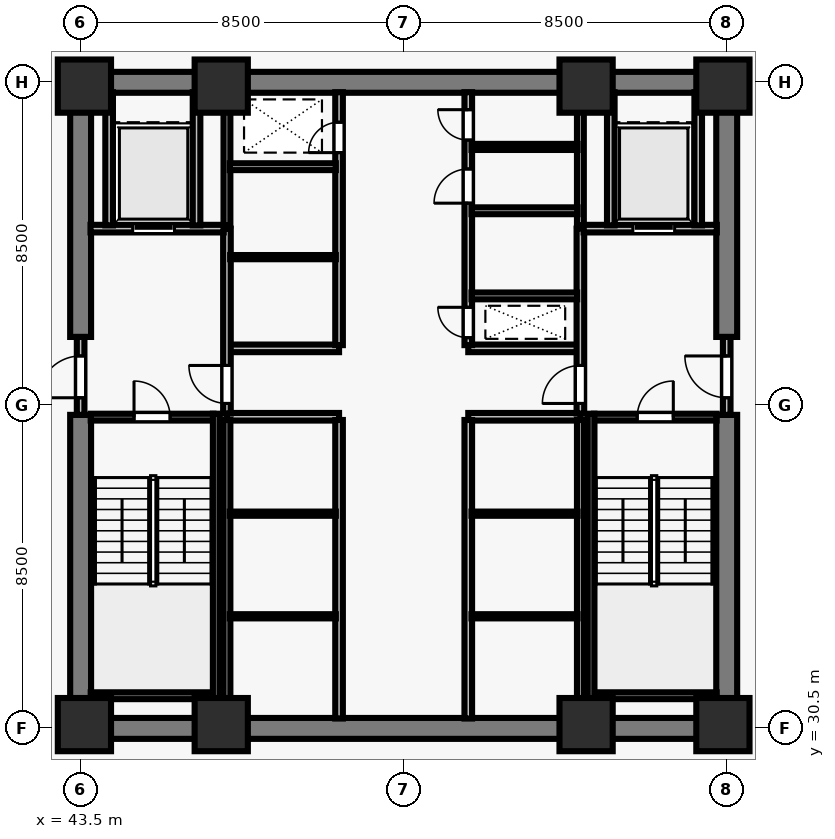
"""IFC4 building model, lengths in metres.
Left out: names, types, materials, properties, quantities, classifications, styles, units other than length and angle.
Written with IfcOpenShell. Run it as: python <this file> out.ifc"""

import sys

from ifc_helpers import new_model, si_unit, direction, frame, frame_2d, origin, origin_2d, place, context, subcontext, project, spatial, rectangle, extrude, element, fill, save


model = new_model("IFC4")
c1 = context("Model", 3, precision=1e-05, world=origin(), true_north=direction((0.0, 1.0)))
c2 = subcontext(c1, "Body", "Model", "MODEL_VIEW")
j1 = project(units=[si_unit("LENGTHUNIT", "METRE"), si_unit("PLANEANGLEUNIT", "RADIAN")], contexts=[c1])
p1 = place(None, origin())
s1 = spatial("IfcSite", under=j1, at=p1, CompositionType="ELEMENT")
p2 = place(p1, origin())
s2 = spatial("IfcBuilding", under=s1, at=p2, CompositionType="ELEMENT")
p3 = place(p2, frame((0.0, 0.0, -4.0)))
s3 = spatial("IfcBuildingStorey", under=s2, at=p3, CompositionType="ELEMENT", Elevation=-4.0)
for number, where, z_axis, x_axis in (
    (1, (43.6, 30.6, 0.0), (0.0, 0.0, 1.0), (1.0, 0.0, 0.0)),
    (2, (47.2, 30.6, 0.0), (0.0, 0.0, 1.0), (1.0, 0.0, 0.0)),
    (3, (56.8, 30.6, 0.0), (0.0, 0.0, 1.0), (1.0, 0.0, 0.0)),
    (4, (60.4, 30.6, 0.0), (0.0, 0.0, 1.0), (1.0, 0.0, 0.0)),
    (5, (43.6, 47.4, 0.0), (0.0, 0.0, 1.0), (1.0, 0.0, 0.0)),
    (6, (47.2, 47.4, 0.0), (0.0, 0.0, 1.0), (1.0, 0.0, 0.0)),
    (7, (56.8, 47.4, 0.0), (0.0, 0.0, 1.0), (1.0, 0.0, 0.0)),
    (8, (60.4, 47.4, 0.0), (0.0, 0.0, 1.0), (1.0, 0.0, 0.0)),
):
    element("IfcColumn", number, at=place(p3, frame(where, z_axis=z_axis, x_axis=x_axis)), inside=s3, PredefinedType="COLUMN", context=c2, shape_type="SweptSolid", body=[
        extrude(rectangle(XDim=1.4, YDim=1.4, at=origin_2d()), origin(), (0.0, 0.0, 1.0), 4.0),
    ])
for number, where, z_axis, x_axis in (
    (9, (43.225, 30.5, 0.0), (0.0, 0.0, 1.0), (1.0, 0.0, 0.0)),
    (10, (43.225, 47.5, 0.0), (0.0, 0.0, 1.0), (1.0, 0.0, 0.0)),
):
    element("IfcWall", number, at=place(p3, frame(where, z_axis=z_axis, x_axis=x_axis)), inside=s3, PredefinedType="SHEAR", context=c2, shape_type="SweptSolid", body=[
        extrude(rectangle(XDim=17.55, YDim=0.55, at=frame_2d((8.775, 0.0))), origin(), (0.0, 0.0, 1.0), 3.7),
    ])
p4 = place(p3, frame((43.5, 30.765, 0.0), z_axis=(0.0, 0.0, 1.0), x_axis=(0.0, 1.0, 0.0)))
e11 = element("IfcWall", 11, at=p4, inside=s3, PredefinedType="SHEAR", context=c2, shape_type="SweptSolid", body=[
    extrude(rectangle(XDim=7.985, YDim=0.55, at=frame_2d((3.993, 0.0))), origin(), (0.0, 0.0, 1.0), 3.7),
])
p5 = place(p3, frame((43.5, 40.8, 0.0), z_axis=(0.0, 0.0, 1.0), x_axis=(0.0, 1.0, 0.0)))
e12 = element("IfcWall", 12, at=p5, inside=s3, PredefinedType="SHEAR", context=c2, shape_type="SweptSolid", body=[
    extrude(rectangle(XDim=6.435, YDim=0.55, at=frame_2d((3.218, 0.0))), origin(), (0.0, 0.0, 1.0), 3.7),
])
p6 = place(p3, frame((60.5, 30.765, 0.0), z_axis=(0.0, 0.0, 1.0), x_axis=(0.0, 1.0, 0.0)))
e13 = element("IfcWall", 13, at=p6, inside=s3, PredefinedType="SHEAR", context=c2, shape_type="SweptSolid", body=[
    extrude(rectangle(XDim=7.985, YDim=0.55, at=frame_2d((3.993, 0.0))), origin(), (0.0, 0.0, 1.0), 3.7),
])
p7 = place(p3, frame((60.5, 40.8, 0.0), z_axis=(0.0, 0.0, 1.0), x_axis=(0.0, 1.0, 0.0)))
e14 = element("IfcWall", 14, at=p7, inside=s3, PredefinedType="SHEAR", context=c2, shape_type="SweptSolid", body=[
    extrude(rectangle(XDim=6.435, YDim=0.55, at=frame_2d((3.218, 0.0))), origin(), (0.0, 0.0, 1.0), 3.7),
])
for number, where, z_axis, x_axis in (
    (15, (47.35, 38.7, 0.0), (0.0, 0.0, 1.0), (1.0, 0.0, 0.0)),
    (16, (47.35, 40.5, 0.0), (0.0, 0.0, 1.0), (1.0, 0.0, 0.0)),
    (17, (53.7, 38.7, 0.0), (0.0, 0.0, 1.0), (1.0, 0.0, 0.0)),
    (18, (53.7, 40.5, 0.0), (0.0, 0.0, 1.0), (1.0, 0.0, 0.0)),
):
    element("IfcWall", number, at=place(p3, frame(where, z_axis=z_axis, x_axis=x_axis)), inside=s3, PredefinedType="SOLIDWALL", context=c2, shape_type="SweptSolid", body=[
        extrude(rectangle(XDim=2.95, YDim=0.2, at=frame_2d((1.475, 0.0))), origin(), (0.0, 0.0, 1.0), 3.7),
    ])
for number, where, z_axis, x_axis in (
    (19, (50.3, 30.76, 0.0), (0.0, 0.0, 1.0), (0.0, 1.0, 0.0)),
    (20, (53.7, 30.76, 0.0), (0.0, 0.0, 1.0), (0.0, 1.0, 0.0)),
):
    element("IfcWall", number, at=place(p3, frame(where, z_axis=z_axis, x_axis=x_axis)), inside=s3, PredefinedType="SOLIDWALL", context=c2, shape_type="SweptSolid", body=[
        extrude(rectangle(XDim=7.855, YDim=0.2, at=frame_2d((3.927, 0.0))), origin(), (0.0, 0.0, 1.0), 3.7),
    ])
p8 = place(p3, frame((50.3, 40.585, 0.0), z_axis=(0.0, 0.0, 1.0), x_axis=(0.0, 1.0, 0.0)))
e21 = element("IfcWall", 21, at=p8, inside=s3, PredefinedType="SOLIDWALL", context=c2, shape_type="SweptSolid", body=[
    extrude(rectangle(XDim=6.655, YDim=0.2, at=frame_2d((3.328, 0.0))), origin(), (0.0, 0.0, 1.0), 3.7),
])
p9 = place(p8, frame((5.065, 0.0, 0.0)))
e22 = element("IfcOpeningElement", 22, at=p9, cuts=e21, PredefinedType="OPENING", context=c2, shape_type="SweptSolid", body=[
    extrude(rectangle(XDim=0.8, YDim=2.08, at=frame_2d((0.4, 1.04))), frame((0.0, 0.11, 0.0), z_axis=(0.0, -1.0, 0.0), x_axis=(1.0, 0.0, 0.0)), (0.0, 0.0, 1.0), 0.22),
])
p10 = place(p3, frame((53.7, 40.585, 0.0), z_axis=(0.0, 0.0, 1.0), x_axis=(0.0, 1.0, 0.0)))
e23 = element("IfcWall", 23, at=p10, inside=s3, PredefinedType="SOLIDWALL", context=c2, shape_type="SweptSolid", body=[
    extrude(rectangle(XDim=6.655, YDim=0.2, at=frame_2d((3.328, 0.0))), origin(), (0.0, 0.0, 1.0), 3.7),
])
p11 = place(p10, frame((0.195, 0.0, 0.0)))
e24 = element("IfcOpeningElement", 24, at=p11, cuts=e23, PredefinedType="OPENING", context=c2, shape_type="SweptSolid", body=[
    extrude(rectangle(XDim=0.8, YDim=2.08, at=frame_2d((0.4, 1.04))), frame((0.0, 0.11, 0.0), z_axis=(0.0, -1.0, 0.0), x_axis=(1.0, 0.0, 0.0)), (0.0, 0.0, 1.0), 0.22),
])
p12 = place(p10, frame((3.735, 0.0, 0.0)))
e25 = element("IfcOpeningElement", 25, at=p12, cuts=e23, PredefinedType="OPENING", context=c2, shape_type="SweptSolid", body=[
    extrude(rectangle(XDim=0.9, YDim=2.12, at=frame_2d((0.45, 1.06))), frame((0.0, 0.11, 0.0), z_axis=(0.0, -1.0, 0.0), x_axis=(1.0, 0.0, 0.0)), (0.0, 0.0, 1.0), 0.22),
])
p13 = place(p10, frame((5.395, 0.0, 0.0)))
e26 = element("IfcOpeningElement", 26, at=p13, cuts=e23, PredefinedType="OPENING", context=c2, shape_type="SweptSolid", body=[
    extrude(rectangle(XDim=0.8, YDim=2.1, at=frame_2d((0.4, 1.05))), frame((0.0, 0.11, 0.0), z_axis=(0.0, -1.0, 0.0), x_axis=(1.0, 0.0, 0.0)), (0.0, 0.0, 1.0), 0.22),
])
p14 = place(p3, frame((43.5, 38.75, 0.0), z_axis=(0.0, 0.0, 1.0), x_axis=(0.0, 1.0, 0.0)))
e27 = element("IfcWall", 27, at=p14, inside=s3, PredefinedType="SOLIDWALL", context=c2, shape_type="SweptSolid", body=[
    extrude(rectangle(XDim=2.05, YDim=0.2, at=frame_2d((1.025, 0.0))), origin(), (0.0, 0.0, 1.0), 3.7),
])
p15 = place(p14, frame((0.45, 0.0, 0.0)))
e28 = element("IfcOpeningElement", 28, at=p15, cuts=e27, PredefinedType="OPENING", context=c2, shape_type="SweptSolid", body=[
    extrude(rectangle(XDim=1.1, YDim=2.15, at=frame_2d((0.55, 1.075))), frame((0.0, 0.11, 0.0), z_axis=(0.0, -1.0, 0.0), x_axis=(1.0, 0.0, 0.0)), (0.0, 0.0, 1.0), 0.22),
])
p16 = place(p3, frame((47.35, 38.785, 0.0), z_axis=(0.0, 0.0, 1.0), x_axis=(0.0, 1.0, 0.0)))
e29 = element("IfcWall", 29, at=p16, inside=s3, PredefinedType="SOLIDWALL", context=c2, shape_type="SweptSolid", body=[
    extrude(rectangle(XDim=4.865, YDim=0.2, at=frame_2d((2.433, 0.0))), origin(), (0.0, 0.0, 1.0), 3.7),
])
p17 = place(p16, frame((0.265, 0.0, 0.0)))
e30 = element("IfcOpeningElement", 30, at=p17, cuts=e29, PredefinedType="OPENING", context=c2, shape_type="SweptSolid", body=[
    extrude(rectangle(XDim=1.0, YDim=2.15, at=frame_2d((0.5, 1.075))), frame((0.0, 0.11, 0.0), z_axis=(0.0, -1.0, 0.0), x_axis=(1.0, 0.0, 0.0)), (0.0, 0.0, 1.0), 0.22),
])
p18 = place(p3, frame((43.76, 43.65, 0.0), z_axis=(0.0, 0.0, 1.0), x_axis=(1.0, 0.0, 0.0)))
e31 = element("IfcWall", 31, at=p18, inside=s3, PredefinedType="SOLIDWALL", context=c2, shape_type="SweptSolid", body=[
    extrude(rectangle(XDim=3.505, YDim=0.2, at=frame_2d((1.752, 0.0))), origin(), (0.0, 0.0, 1.0), 3.7),
])
p19 = place(p18, frame((1.11, 0.0, 0.0)))
e32 = element("IfcOpeningElement", 32, at=p19, cuts=e31, PredefinedType="OPENING", context=c2, shape_type="SweptSolid", body=[
    extrude(rectangle(XDim=1.1, YDim=2.2, at=frame_2d((0.55, 1.1))), frame((0.0, 0.11, 0.0), z_axis=(0.0, -1.0, 0.0), x_axis=(1.0, 0.0, 0.0)), (0.0, 0.0, 1.0), 0.22),
])
for number, where, z_axis, x_axis in (
    (33, (46.55, 43.735, 0.0), (0.0, 0.0, 1.0), (0.0, 1.0, 0.0)),
    (34, (44.25, 43.735, 0.0), (0.0, 0.0, 1.0), (0.0, 1.0, 0.0)),
):
    element("IfcWall", number, at=place(p3, frame(where, z_axis=z_axis, x_axis=x_axis)), inside=s3, PredefinedType="SOLIDWALL", context=c2, shape_type="SweptSolid", body=[
        extrude(rectangle(XDim=3.505, YDim=0.2, at=frame_2d((1.752, 0.0))), origin(), (0.0, 0.0, 1.0), 3.7),
    ])
p20 = place(p3, frame((60.5, 38.75, 0.0), z_axis=(0.0, 0.0, 1.0), x_axis=(0.0, 1.0, 0.0)))
e35 = element("IfcWall", 35, at=p20, inside=s3, PredefinedType="SOLIDWALL", context=c2, shape_type="SweptSolid", body=[
    extrude(rectangle(XDim=2.05, YDim=0.2, at=frame_2d((1.025, 0.0))), origin(), (0.0, 0.0, 1.0), 3.7),
])
p21 = place(p20, frame((0.45, 0.0, 0.0)))
e36 = element("IfcOpeningElement", 36, at=p21, cuts=e35, PredefinedType="OPENING", context=c2, shape_type="SweptSolid", body=[
    extrude(rectangle(XDim=1.1, YDim=2.15, at=frame_2d((0.55, 1.075))), frame((0.0, 0.11, 0.0), z_axis=(0.0, -1.0, 0.0), x_axis=(1.0, 0.0, 0.0)), (0.0, 0.0, 1.0), 0.22),
])
p22 = place(p3, frame((56.65, 38.785, 0.0), z_axis=(0.0, 0.0, 1.0), x_axis=(0.0, 1.0, 0.0)))
e37 = element("IfcWall", 37, at=p22, inside=s3, PredefinedType="SOLIDWALL", context=c2, shape_type="SweptSolid", body=[
    extrude(rectangle(XDim=4.865, YDim=0.2, at=frame_2d((2.433, 0.0))), origin(), (0.0, 0.0, 1.0), 3.7),
])
p23 = place(p22, frame((0.265, 0.0, 0.0)))
e38 = element("IfcOpeningElement", 38, at=p23, cuts=e37, PredefinedType="OPENING", context=c2, shape_type="SweptSolid", body=[
    extrude(rectangle(XDim=1.0, YDim=2.15, at=frame_2d((0.5, 1.075))), frame((0.0, 0.11, 0.0), z_axis=(0.0, -1.0, 0.0), x_axis=(1.0, 0.0, 0.0)), (0.0, 0.0, 1.0), 0.22),
])
p24 = place(p3, frame((56.735, 43.65, 0.0), z_axis=(0.0, 0.0, 1.0), x_axis=(1.0, 0.0, 0.0)))
e39 = element("IfcWall", 39, at=p24, inside=s3, PredefinedType="SOLIDWALL", context=c2, shape_type="SweptSolid", body=[
    extrude(rectangle(XDim=3.505, YDim=0.2, at=frame_2d((1.752, 0.0))), origin(), (0.0, 0.0, 1.0), 3.7),
])
p25 = place(p24, frame((1.295, 0.0, 0.0)))
e40 = element("IfcOpeningElement", 40, at=p25, cuts=e39, PredefinedType="OPENING", context=c2, shape_type="SweptSolid", body=[
    extrude(rectangle(XDim=1.1, YDim=2.2, at=frame_2d((0.55, 1.1))), frame((0.0, 0.11, 0.0), z_axis=(0.0, -1.0, 0.0), x_axis=(1.0, 0.0, 0.0)), (0.0, 0.0, 1.0), 0.22),
])
for number, where, z_axis, x_axis in (
    (41, (57.45, 43.735, 0.0), (0.0, 0.0, 1.0), (0.0, 1.0, 0.0)),
    (42, (59.75, 43.735, 0.0), (0.0, 0.0, 1.0), (0.0, 1.0, 0.0)),
):
    element("IfcWall", number, at=place(p3, frame(where, z_axis=z_axis, x_axis=x_axis)), inside=s3, PredefinedType="SOLIDWALL", context=c2, shape_type="SweptSolid", body=[
        extrude(rectangle(XDim=3.505, YDim=0.2, at=frame_2d((1.752, 0.0))), origin(), (0.0, 0.0, 1.0), 3.7),
    ])
p26 = place(p3, frame((47.35, 30.76, 0.0), z_axis=(0.0, 0.0, 1.0), x_axis=(0.0, 1.0, 0.0)))
e43 = element("IfcWall", 43, at=p26, inside=s3, PredefinedType="SOLIDWALL", context=c2, shape_type="SweptSolid", body=[
    extrude(rectangle(XDim=7.855, YDim=0.18, at=frame_2d((3.927, 0.0))), origin(), (0.0, 0.0, 1.0), 3.7),
])
for number, where, z_axis, x_axis in (
    (44, (47.425, 33.45, 0.0), (0.0, 0.0, 1.0), (1.0, 0.0, 0.0)),
    (45, (47.425, 36.15, 0.0), (0.0, 0.0, 1.0), (1.0, 0.0, 0.0)),
):
    element("IfcWall", number, at=place(p3, frame(where, z_axis=z_axis, x_axis=x_axis)), inside=s3, PredefinedType="PARTITIONING", context=c2, shape_type="SweptSolid", body=[
        extrude(rectangle(XDim=2.79, YDim=0.11, at=frame_2d((1.395, 0.0))), origin(), (0.0, 0.0, 1.0), 3.7),
    ])
p27 = place(p3, frame((56.65, 30.76, 0.0), z_axis=(0.0, 0.0, 1.0), x_axis=(0.0, 1.0, 0.0)))
e46 = element("IfcWall", 46, at=p27, inside=s3, PredefinedType="SOLIDWALL", context=c2, shape_type="SweptSolid", body=[
    extrude(rectangle(XDim=7.855, YDim=0.18, at=frame_2d((3.927, 0.0))), origin(), (0.0, 0.0, 1.0), 3.7),
])
for number, where, z_axis, x_axis in (
    (47, (53.785, 33.45, 0.0), (0.0, 0.0, 1.0), (1.0, 0.0, 0.0)),
    (48, (53.785, 36.15, 0.0), (0.0, 0.0, 1.0), (1.0, 0.0, 0.0)),
):
    element("IfcWall", number, at=place(p3, frame(where, z_axis=z_axis, x_axis=x_axis)), inside=s3, PredefinedType="PARTITIONING", context=c2, shape_type="SweptSolid", body=[
        extrude(rectangle(XDim=2.79, YDim=0.11, at=frame_2d((1.395, 0.0))), origin(), (0.0, 0.0, 1.0), 3.7),
    ])
p28 = place(p3, frame((47.35, 43.735, 0.0), z_axis=(0.0, 0.0, 1.0), x_axis=(0.0, 1.0, 0.0)))
e49 = element("IfcWall", 49, at=p28, inside=s3, PredefinedType="SOLIDWALL", context=c2, shape_type="SweptSolid", body=[
    extrude(rectangle(XDim=3.505, YDim=0.18, at=frame_2d((1.752, 0.0))), origin(), (0.0, 0.0, 1.0), 3.7),
])
p29 = place(p3, frame((47.435, 42.9, 0.0), z_axis=(0.0, 0.0, 1.0), x_axis=(1.0, 0.0, 0.0)))
e50 = element("IfcWall", 50, at=p29, inside=s3, PredefinedType="PARTITIONING", context=c2, shape_type="SweptSolid", body=[
    extrude(rectangle(XDim=2.78, YDim=0.11, at=frame_2d((1.39, 0.0))), origin(), (0.0, 0.0, 1.0), 3.7),
])
p30 = place(p3, frame((47.425, 45.28, 0.0), z_axis=(0.0, 0.0, 1.0), x_axis=(1.0, 0.0, 0.0)))
e51 = element("IfcWall", 51, at=p30, inside=s3, PredefinedType="SOLIDWALL", context=c2, shape_type="SweptSolid", body=[
    extrude(rectangle(XDim=2.79, YDim=0.18, at=frame_2d((1.395, 0.0))), origin(), (0.0, 0.0, 1.0), 3.7),
])
p31 = place(p3, frame((56.65, 43.735, 0.0), z_axis=(0.0, 0.0, 1.0), x_axis=(0.0, 1.0, 0.0)))
e52 = element("IfcWall", 52, at=p31, inside=s3, PredefinedType="SOLIDWALL", context=c2, shape_type="SweptSolid", body=[
    extrude(rectangle(XDim=3.505, YDim=0.18, at=frame_2d((1.752, 0.0))), origin(), (0.0, 0.0, 1.0), 3.7),
])
p32 = place(p3, frame((53.785, 41.88, 0.0), z_axis=(0.0, 0.0, 1.0), x_axis=(1.0, 0.0, 0.0)))
e53 = element("IfcWall", 53, at=p32, inside=s3, PredefinedType="SOLIDWALL", context=c2, shape_type="SweptSolid", body=[
    extrude(rectangle(XDim=2.78, YDim=0.18, at=frame_2d((1.39, 0.0))), origin(), (0.0, 0.0, 1.0), 3.7),
])
p33 = place(p3, frame((53.785, 44.12, 0.0), z_axis=(0.0, 0.0, 1.0), x_axis=(1.0, 0.0, 0.0)))
e54 = element("IfcWall", 54, at=p33, inside=s3, PredefinedType="SOLIDWALL", context=c2, shape_type="SweptSolid", body=[
    extrude(rectangle(XDim=2.79, YDim=0.18, at=frame_2d((1.395, 0.0))), origin(), (0.0, 0.0, 1.0), 3.7),
])
p34 = place(p3, frame((53.785, 45.8, 0.0), z_axis=(0.0, 0.0, 1.0), x_axis=(1.0, 0.0, 0.0)))
e55 = element("IfcWall", 55, at=p34, inside=s3, PredefinedType="PARTITIONING", context=c2, shape_type="SweptSolid", body=[
    extrude(rectangle(XDim=2.79, YDim=0.16, at=frame_2d((1.395, 0.0))), origin(), (0.0, 0.0, 1.0), 3.7),
])
p35 = place(p3, frame((43.765, 38.69, 0.0), z_axis=(0.0, 0.0, 1.0), x_axis=(1.0, 0.0, 0.0)))
e56 = element("IfcWall", 56, at=p35, inside=s3, PredefinedType="SOLIDWALL", context=c2, shape_type="SweptSolid", body=[
    extrude(rectangle(XDim=3.23, YDim=0.18, at=frame_2d((1.615, 0.0))), origin(), (0.0, 0.0, 1.0), 3.7),
])
p36 = place(p35, frame((1.14, 0.0, 0.0)))
e57 = element("IfcOpeningElement", 57, at=p36, cuts=e56, PredefinedType="OPENING", context=c2, shape_type="SweptSolid", body=[
    extrude(rectangle(XDim=0.95, YDim=2.15, at=frame_2d((0.475, 1.075))), frame((0.0, 0.1, 0.0), z_axis=(0.0, -1.0, 0.0), x_axis=(1.0, 0.0, 0.0)), (0.0, 0.0, 1.0), 0.2),
])
p37 = place(p3, frame((43.765, 31.36, 0.0), z_axis=(0.0, 0.0, 1.0), x_axis=(1.0, 0.0, 0.0)))
e58 = element("IfcWall", 58, at=p37, inside=s3, PredefinedType="SOLIDWALL", context=c2, shape_type="SweptSolid", body=[
    extrude(rectangle(XDim=3.23, YDim=0.18, at=frame_2d((1.615, 0.0))), origin(), (0.0, 0.0, 1.0), 3.7),
])
p38 = place(p3, frame((47.07, 38.78, 0.0), z_axis=(0.0, 0.0, 1.0), x_axis=(0.0, -1.0, 0.0)))
e59 = element("IfcWall", 59, at=p38, inside=s3, PredefinedType="SOLIDWALL", context=c2, shape_type="SweptSolid", body=[
    extrude(rectangle(XDim=8.017, YDim=0.18, at=frame_2d((4.009, 0.0))), origin(), (0.0, 0.0, 1.0), 3.7),
])
p39 = place(p3, frame((57.005, 38.69, 0.0), z_axis=(0.0, 0.0, 1.0), x_axis=(1.0, 0.0, 0.0)))
e60 = element("IfcWall", 60, at=p39, inside=s3, PredefinedType="SOLIDWALL", context=c2, shape_type="SweptSolid", body=[
    extrude(rectangle(XDim=3.23, YDim=0.18, at=frame_2d((1.615, 0.0))), origin(), (0.0, 0.0, 1.0), 3.7),
])
p40 = place(p39, frame((1.14, 0.0, 0.0)))
e61 = element("IfcOpeningElement", 61, at=p40, cuts=e60, PredefinedType="OPENING", context=c2, shape_type="SweptSolid", body=[
    extrude(rectangle(XDim=0.95, YDim=2.15, at=frame_2d((0.475, 1.075))), frame((0.0, 0.1, 0.0), z_axis=(0.0, -1.0, 0.0), x_axis=(1.0, 0.0, 0.0)), (0.0, 0.0, 1.0), 0.2),
])
p41 = place(p3, frame((57.005, 31.36, 0.0), z_axis=(0.0, 0.0, 1.0), x_axis=(1.0, 0.0, 0.0)))
e62 = element("IfcWall", 62, at=p41, inside=s3, PredefinedType="SOLIDWALL", context=c2, shape_type="SweptSolid", body=[
    extrude(rectangle(XDim=3.23, YDim=0.18, at=frame_2d((1.615, 0.0))), origin(), (0.0, 0.0, 1.0), 3.7),
])
p42 = place(p3, frame((56.93, 38.78, 0.0), z_axis=(0.0, 0.0, 1.0), x_axis=(0.0, -1.0, 0.0)))
e63 = element("IfcWall", 63, at=p42, inside=s3, PredefinedType="SOLIDWALL", context=c2, shape_type="SweptSolid", body=[
    extrude(rectangle(XDim=8.017, YDim=0.18, at=frame_2d((4.009, 0.0))), origin(), (0.0, 0.0, 1.0), 3.7),
])
p43 = place(p15, origin())
e64 = element("IfcDoor", 64, at=p43, inside=s3, OperationType="SINGLE_SWING_LEFT", PredefinedType="DOOR", context=c2, shape_type="SweptSolid", body=[
    extrude(rectangle(XDim=1.1, YDim=2.15, at=frame_2d((0.55, 1.075))), frame((0.0, 0.025, 0.0), z_axis=(0.0, -1.0, 0.0), x_axis=(1.0, 0.0, 0.0)), (0.0, 0.0, 1.0), 0.05),
])
fill(e28, e64)
p44 = place(p17, origin())
e65 = element("IfcDoor", 65, at=p44, inside=s3, OperationType="SINGLE_SWING_RIGHT", PredefinedType="DOOR", context=c2, shape_type="SweptSolid", body=[
    extrude(rectangle(XDim=1.0, YDim=2.15, at=frame_2d((0.5, 1.075))), frame((0.0, 0.025, 0.0), z_axis=(0.0, -1.0, 0.0), x_axis=(1.0, 0.0, 0.0)), (0.0, 0.0, 1.0), 0.05),
])
fill(e30, e65)
p45 = place(p19, origin())
e66 = element("IfcDoor", 66, at=p45, inside=s3, OperationType="SLIDING_TO_LEFT", PredefinedType="DOOR", context=c2, shape_type="SweptSolid", body=[
    extrude(rectangle(XDim=1.1, YDim=2.2, at=frame_2d((0.55, 1.1))), frame((0.0, 0.025, 0.0), z_axis=(0.0, -1.0, 0.0), x_axis=(1.0, 0.0, 0.0)), (0.0, 0.0, 1.0), 0.05),
])
fill(e32, e66)
p46 = place(p21, origin())
e67 = element("IfcDoor", 67, at=p46, inside=s3, OperationType="SINGLE_SWING_RIGHT", PredefinedType="DOOR", context=c2, shape_type="SweptSolid", body=[
    extrude(rectangle(XDim=1.1, YDim=2.15, at=frame_2d((0.55, 1.075))), frame((0.0, 0.025, 0.0), z_axis=(0.0, -1.0, 0.0), x_axis=(1.0, 0.0, 0.0)), (0.0, 0.0, 1.0), 0.05),
])
fill(e36, e67)
p47 = place(p23, origin())
e68 = element("IfcDoor", 68, at=p47, inside=s3, OperationType="SINGLE_SWING_LEFT", PredefinedType="DOOR", context=c2, shape_type="SweptSolid", body=[
    extrude(rectangle(XDim=1.0, YDim=2.15, at=frame_2d((0.5, 1.075))), frame((0.0, 0.025, 0.0), z_axis=(0.0, -1.0, 0.0), x_axis=(1.0, 0.0, 0.0)), (0.0, 0.0, 1.0), 0.05),
])
fill(e38, e68)
p48 = place(p25, origin())
e69 = element("IfcDoor", 69, at=p48, inside=s3, OperationType="SLIDING_TO_LEFT", PredefinedType="DOOR", context=c2, shape_type="SweptSolid", body=[
    extrude(rectangle(XDim=1.1, YDim=2.2, at=frame_2d((0.55, 1.1))), frame((0.0, 0.025, 0.0), z_axis=(0.0, -1.0, 0.0), x_axis=(1.0, 0.0, 0.0)), (0.0, 0.0, 1.0), 0.05),
])
fill(e40, e69)
p49 = place(p9, origin())
e70 = element("IfcDoor", 70, at=p49, inside=s3, OperationType="SINGLE_SWING_LEFT", PredefinedType="DOOR", context=c2, shape_type="SweptSolid", body=[
    extrude(rectangle(XDim=0.8, YDim=2.08, at=frame_2d((0.4, 1.04))), frame((0.0, 0.025, 0.0), z_axis=(0.0, -1.0, 0.0), x_axis=(1.0, 0.0, 0.0)), (0.0, 0.0, 1.0), 0.05),
])
fill(e22, e70)
p50 = place(p11, origin())
e71 = element("IfcDoor", 71, at=p50, inside=s3, OperationType="SINGLE_SWING_RIGHT", PredefinedType="DOOR", context=c2, shape_type="SweptSolid", body=[
    extrude(rectangle(XDim=0.8, YDim=2.08, at=frame_2d((0.4, 1.04))), frame((0.0, 0.025, 0.0), z_axis=(0.0, -1.0, 0.0), x_axis=(1.0, 0.0, 0.0)), (0.0, 0.0, 1.0), 0.05),
])
fill(e24, e71)
p51 = place(p12, origin())
e72 = element("IfcDoor", 72, at=p51, inside=s3, OperationType="SINGLE_SWING_LEFT", PredefinedType="DOOR", context=c2, shape_type="SweptSolid", body=[
    extrude(rectangle(XDim=0.9, YDim=2.12, at=frame_2d((0.45, 1.06))), frame((0.0, 0.025, 0.0), z_axis=(0.0, -1.0, 0.0), x_axis=(1.0, 0.0, 0.0)), (0.0, 0.0, 1.0), 0.05),
])
fill(e25, e72)
p52 = place(p13, origin())
e73 = element("IfcDoor", 73, at=p52, inside=s3, OperationType="SINGLE_SWING_RIGHT", PredefinedType="DOOR", context=c2, shape_type="SweptSolid", body=[
    extrude(rectangle(XDim=0.8, YDim=2.1, at=frame_2d((0.4, 1.05))), frame((0.0, 0.025, 0.0), z_axis=(0.0, -1.0, 0.0), x_axis=(1.0, 0.0, 0.0)), (0.0, 0.0, 1.0), 0.05),
])
fill(e26, e73)
p53 = place(p36, origin())
e74 = element("IfcDoor", 74, at=p53, inside=s3, OperationType="SINGLE_SWING_LEFT", PredefinedType="DOOR", context=c2, shape_type="SweptSolid", body=[
    extrude(rectangle(XDim=0.95, YDim=2.15, at=frame_2d((0.475, 1.075))), frame((0.0, 0.025, 0.0), z_axis=(0.0, -1.0, 0.0), x_axis=(1.0, 0.0, 0.0)), (0.0, 0.0, 1.0), 0.05),
])
fill(e57, e74)
p54 = place(p40, origin())
e75 = element("IfcDoor", 75, at=p54, inside=s3, OperationType="SINGLE_SWING_RIGHT", PredefinedType="DOOR", context=c2, shape_type="SweptSolid", body=[
    extrude(rectangle(XDim=0.95, YDim=2.15, at=frame_2d((0.475, 1.075))), frame((0.0, 0.025, 0.0), z_axis=(0.0, -1.0, 0.0), x_axis=(1.0, 0.0, 0.0)), (0.0, 0.0, 1.0), 0.05),
])
fill(e61, e75)
save(model, sys.argv[1])
